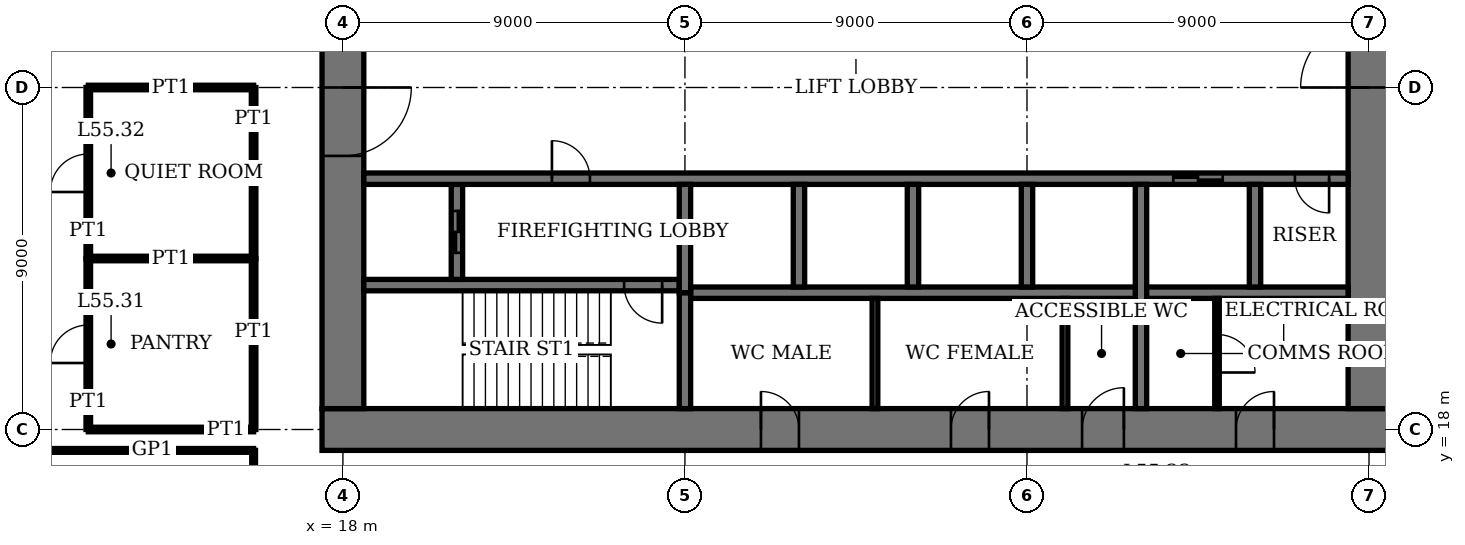
"""IFC4 building model, lengths in metres.
Left out: names, types, materials, properties, quantities, classifications, styles, units other than length and angle.
Written with IfcOpenShell. Run it as: python <this file> out.ifc"""

import sys

from ifc_helpers import new_model, si_unit, direction, frame, frame_2d, origin, place, context, subcontext, project, spatial, rectangle, extrude, element, fill, save


model = new_model("IFC4")
c1 = context("Model", 3, precision=1e-05, world=origin(), true_north=direction((0.0, 1.0)))
c2 = subcontext(c1, "Body", "Model", "MODEL_VIEW")
j1 = project(units=[si_unit("LENGTHUNIT", "METRE"), si_unit("PLANEANGLEUNIT", "RADIAN")], contexts=[c1])
p1 = place(None, origin())
s1 = spatial("IfcSite", under=j1, at=p1, CompositionType="ELEMENT")
p2 = place(p1, origin())
s2 = spatial("IfcBuilding", under=s1, at=p2, CompositionType="ELEMENT")
p3 = place(p2, frame((0.0, 0.0, 226.2)))
s3 = spatial("IfcBuildingStorey", under=s2, at=p3, CompositionType="ELEMENT", Elevation=226.2)
p4 = place(p3, frame((17.45, 18.0, 0.0), z_axis=(0.0, 0.0, 1.0), x_axis=(1.0, 0.0, 0.0)))
e1 = element("IfcWall", 1, at=p4, inside=s3, PredefinedType="SHEAR", context=c2, shape_type="SweptSolid", body=[
    extrude(rectangle(XDim=28.1, YDim=1.1, at=frame_2d((14.05, 0.0))), origin(), (0.0, 0.0, 1.0), 4.0),
])
p5 = place(p4, frame((11.55, 0.0, 0.0)))
e2 = element("IfcOpeningElement", 2, at=p5, cuts=e1, PredefinedType="OPENING", context=c2, shape_type="SweptSolid", body=[
    extrude(rectangle(XDim=1.0, YDim=2.4, at=frame_2d((0.5, 1.2))), frame((0.0, 0.56, 0.0), z_axis=(0.0, -1.0, 0.0), x_axis=(1.0, 0.0, 0.0)), (0.0, 0.0, 1.0), 1.12),
])
p6 = place(p4, frame((16.55, 0.0, 0.0)))
e3 = element("IfcOpeningElement", 3, at=p6, cuts=e1, PredefinedType="OPENING", context=c2, shape_type="SweptSolid", body=[
    extrude(rectangle(XDim=1.0, YDim=2.4, at=frame_2d((0.5, 1.2))), frame((0.0, 0.56, 0.0), z_axis=(0.0, -1.0, 0.0), x_axis=(1.0, 0.0, 0.0)), (0.0, 0.0, 1.0), 1.12),
])
p7 = place(p4, frame((20.0, 0.0, 0.0)))
e4 = element("IfcOpeningElement", 4, at=p7, cuts=e1, PredefinedType="OPENING", context=c2, shape_type="SweptSolid", body=[
    extrude(rectangle(XDim=1.1, YDim=2.4, at=frame_2d((0.55, 1.2))), frame((0.0, 0.56, 0.0), z_axis=(0.0, -1.0, 0.0), x_axis=(1.0, 0.0, 0.0)), (0.0, 0.0, 1.0), 1.12),
])
p8 = place(p4, frame((24.05, 0.0, 0.0)))
e5 = element("IfcOpeningElement", 5, at=p8, cuts=e1, PredefinedType="OPENING", context=c2, shape_type="SweptSolid", body=[
    extrude(rectangle(XDim=1.0, YDim=2.4, at=frame_2d((0.5, 1.2))), frame((0.0, 0.56, 0.0), z_axis=(0.0, -1.0, 0.0), x_axis=(1.0, 0.0, 0.0)), (0.0, 0.0, 1.0), 1.12),
])
p9 = place(p3, frame((18.0, 35.45, 0.0), z_axis=(0.0, 0.0, 1.0), x_axis=(0.0, -1.0, 0.0)))
e6 = element("IfcWall", 6, at=p9, inside=s3, PredefinedType="SHEAR", context=c2, shape_type="SweptSolid", body=[
    extrude(rectangle(XDim=16.9, YDim=1.1, at=frame_2d((8.45, 0.0))), origin(), (0.0, 0.0, 1.0), 4.0),
])
p10 = place(p9, frame((8.45, 0.0, 0.0)))
e7 = element("IfcOpeningElement", 7, at=p10, cuts=e6, PredefinedType="OPENING", context=c2, shape_type="SweptSolid", body=[
    extrude(rectangle(XDim=1.8, YDim=2.4, at=frame_2d((0.9, 1.2))), frame((0.0, 0.56, 0.0), z_axis=(0.0, -1.0, 0.0), x_axis=(1.0, 0.0, 0.0)), (0.0, 0.0, 1.0), 1.12),
])
p11 = place(p3, frame((45.0, 18.55, 0.0), z_axis=(0.0, 0.0, 1.0), x_axis=(0.0, 1.0, 0.0)))
e8 = element("IfcWall", 8, at=p11, inside=s3, PredefinedType="SHEAR", context=c2, shape_type="SweptSolid", body=[
    extrude(rectangle(XDim=16.9, YDim=1.1, at=frame_2d((8.45, 0.0))), origin(), (0.0, 0.0, 1.0), 4.0),
])
p12 = place(p11, frame((8.45, 0.0, 0.0)))
e9 = element("IfcOpeningElement", 9, at=p12, cuts=e8, PredefinedType="OPENING", context=c2, shape_type="SweptSolid", body=[
    extrude(rectangle(XDim=1.8, YDim=2.4, at=frame_2d((0.9, 1.2))), frame((0.0, 0.56, 0.0), z_axis=(0.0, -1.0, 0.0), x_axis=(1.0, 0.0, 0.0)), (0.0, 0.0, 1.0), 1.12),
])
p13 = place(p3, frame((18.55, 21.8, 0.0), z_axis=(0.0, 0.0, 1.0), x_axis=(1.0, 0.0, 0.0)))
e10 = element("IfcWall", 10, at=p13, inside=s3, PredefinedType="SHEAR", context=c2, shape_type="SweptSolid", body=[
    extrude(rectangle(XDim=8.3, YDim=0.3, at=frame_2d((4.15, 0.0))), origin(), (0.0, 0.0, 1.0), 4.0),
])
p14 = place(p13, frame((6.85, 0.0, 0.0)))
e11 = element("IfcOpeningElement", 11, at=p14, cuts=e10, PredefinedType="OPENING", context=c2, shape_type="SweptSolid", body=[
    extrude(rectangle(XDim=1.0, YDim=2.4, at=frame_2d((0.5, 1.2))), frame((0.0, 0.16, 0.0), z_axis=(0.0, -1.0, 0.0), x_axis=(1.0, 0.0, 0.0)), (0.0, 0.0, 1.0), 0.32),
])
p15 = place(p3, frame((27.0, 18.55, 0.0), z_axis=(0.0, 0.0, 1.0), x_axis=(0.0, 1.0, 0.0)))
e12 = element("IfcWall", 12, at=p15, inside=s3, PredefinedType="SHEAR", context=c2, shape_type="SweptSolid", body=[
    extrude(rectangle(XDim=3.05, YDim=0.3, at=frame_2d((1.525, 0.0))), origin(), (0.0, 0.0, 1.0), 4.0),
])
p16 = place(p3, frame((21.0, 21.95, 0.0), z_axis=(0.0, 0.0, 1.0), x_axis=(0.0, 1.0, 0.0)))
e13 = element("IfcWall", 13, at=p16, inside=s3, PredefinedType="SHEAR", context=c2, shape_type="SweptSolid", body=[
    extrude(rectangle(XDim=2.5, YDim=0.3, at=frame_2d((1.25, 0.0))), origin(), (0.0, 0.0, 1.0), 4.0),
])
p17 = place(p16, frame((0.7, 0.0, 0.0)))
e14 = element("IfcOpeningElement", 14, at=p17, cuts=e13, PredefinedType="OPENING", context=c2, shape_type="SweptSolid", body=[
    extrude(rectangle(XDim=1.1, YDim=2.4, at=frame_2d((0.55, 1.2))), frame((0.0, 0.16, 0.0), z_axis=(0.0, -1.0, 0.0), x_axis=(1.0, 0.0, 0.0)), (0.0, 0.0, 1.0), 0.32),
])
p18 = place(p3, frame((18.55, 24.6, 0.0), z_axis=(0.0, 0.0, 1.0), x_axis=(1.0, 0.0, 0.0)))
e15 = element("IfcWall", 15, at=p18, inside=s3, PredefinedType="SHEAR", context=c2, shape_type="SweptSolid", body=[
    extrude(rectangle(XDim=25.9, YDim=0.3, at=frame_2d((12.95, 0.0))), origin(), (0.0, 0.0, 1.0), 4.0),
])
p19 = place(p18, frame((4.95, 0.0, 0.0)))
e16 = element("IfcOpeningElement", 16, at=p19, cuts=e15, PredefinedType="OPENING", context=c2, shape_type="SweptSolid", body=[
    extrude(rectangle(XDim=1.0, YDim=2.4, at=frame_2d((0.5, 1.2))), frame((0.0, 0.16, 0.0), z_axis=(0.0, -1.0, 0.0), x_axis=(1.0, 0.0, 0.0)), (0.0, 0.0, 1.0), 0.32),
])
p20 = place(p18, frame((24.5, 0.0, 0.0)))
e17 = element("IfcOpeningElement", 17, at=p20, cuts=e15, PredefinedType="OPENING", context=c2, shape_type="SweptSolid", body=[
    extrude(rectangle(XDim=0.9, YDim=2.1, at=frame_2d((0.45, 1.05))), frame((0.0, 0.16, 0.0), z_axis=(0.0, -1.0, 0.0), x_axis=(1.0, 0.0, 0.0)), (0.0, 0.0, 1.0), 0.32),
])
p21 = place(p18, frame((21.3, 0.0, 0.0)))
e18 = element("IfcOpeningElement", 18, at=p21, cuts=e15, PredefinedType="OPENING", context=c2, shape_type="SweptSolid", body=[
    extrude(rectangle(XDim=1.3, YDim=2.4, at=frame_2d((0.65, 1.2))), frame((0.0, 0.16, 0.0), z_axis=(0.0, -1.0, 0.0), x_axis=(1.0, 0.0, 0.0)), (0.0, 0.0, 1.0), 0.32),
])
p22 = place(p3, frame((27.15, 21.6, 0.0), z_axis=(0.0, 0.0, 1.0), x_axis=(1.0, 0.0, 0.0)))
e19 = element("IfcWall", 19, at=p22, inside=s3, PredefinedType="SHEAR", context=c2, shape_type="SweptSolid", body=[
    extrude(rectangle(XDim=17.3, YDim=0.3, at=frame_2d((8.65, 0.0))), origin(), (0.0, 0.0, 1.0), 4.0),
])
for number, where, z_axis, x_axis in (
    (20, (30.0, 21.75, 0.0), (0.0, 0.0, 1.0), (0.0, 1.0, 0.0)),
    (21, (33.0, 21.75, 0.0), (0.0, 0.0, 1.0), (0.0, 1.0, 0.0)),
    (22, (36.0, 21.75, 0.0), (0.0, 0.0, 1.0), (0.0, 1.0, 0.0)),
):
    element("IfcWall", number, at=place(p3, frame(where, z_axis=z_axis, x_axis=x_axis)), inside=s3, PredefinedType="SHEAR", context=c2, shape_type="SweptSolid", body=[
        extrude(rectangle(XDim=2.7, YDim=0.3, at=frame_2d((1.35, 0.0))), origin(), (0.0, 0.0, 1.0), 4.0),
    ])
p23 = place(p3, frame((39.0, 18.55, 0.0), z_axis=(0.0, 0.0, 1.0), x_axis=(0.0, 1.0, 0.0)))
e23 = element("IfcWall", 23, at=p23, inside=s3, PredefinedType="SHEAR", context=c2, shape_type="SweptSolid", body=[
    extrude(rectangle(XDim=5.9, YDim=0.3, at=frame_2d((2.95, 0.0))), origin(), (0.0, 0.0, 1.0), 4.0),
])
p24 = place(p3, frame((42.0, 21.75, 0.0), z_axis=(0.0, 0.0, 1.0), x_axis=(0.0, 1.0, 0.0)))
e24 = element("IfcWall", 24, at=p24, inside=s3, PredefinedType="SHEAR", context=c2, shape_type="SweptSolid", body=[
    extrude(rectangle(XDim=2.7, YDim=0.3, at=frame_2d((1.35, 0.0))), origin(), (0.0, 0.0, 1.0), 4.0),
])
p25 = place(p3, frame((27.0, 21.6, 0.0), z_axis=(0.0, 0.0, 1.0), x_axis=(0.0, 1.0, 0.0)))
e25 = element("IfcWall", 25, at=p25, inside=s3, PredefinedType="SHEAR", context=c2, shape_type="SweptSolid", body=[
    extrude(rectangle(XDim=2.85, YDim=0.3, at=frame_2d((1.425, 0.0))), origin(), (0.0, 0.0, 1.0), 4.0),
])
p26 = place(p3, frame((9.7, 17.45, 0.0), z_axis=(0.0, 0.0, 1.0), x_axis=(1.0, 0.0, 0.0)))
e26 = element("IfcWall", 26, at=p26, inside=s3, PredefinedType="PARTITIONING", context=c2, shape_type="SweptSolid", body=[
    extrude(rectangle(XDim=5.95, YDim=0.1, at=frame_2d((2.975, 0.0))), origin(), (0.0, 0.0, 1.0), 3.05),
])
p27 = place(p3, frame((11.3, 18.0, 0.0), z_axis=(0.0, 0.0, 1.0), x_axis=(1.0, 0.0, 0.0)))
e27 = element("IfcWall", 27, at=p27, inside=s3, PredefinedType="PARTITIONING", context=c2, shape_type="SweptSolid", body=[
    extrude(rectangle(XDim=4.35, YDim=0.12, at=frame_2d((2.175, 0.0))), origin(), (0.0, 0.0, 1.0), 3.05),
])
p28 = place(p3, frame((11.3, 22.5, 0.0), z_axis=(0.0, 0.0, 1.0), x_axis=(1.0, 0.0, 0.0)))
e28 = element("IfcWall", 28, at=p28, inside=s3, PredefinedType="PARTITIONING", context=c2, shape_type="SweptSolid", body=[
    extrude(rectangle(XDim=4.35, YDim=0.12, at=frame_2d((2.175, 0.0))), origin(), (0.0, 0.0, 1.0), 3.1),
])
p29 = place(p3, frame((11.3, 27.0, 0.0), z_axis=(0.0, 0.0, 1.0), x_axis=(1.0, 0.0, 0.0)))
e29 = element("IfcWall", 29, at=p29, inside=s3, PredefinedType="PARTITIONING", context=c2, shape_type="SweptSolid", body=[
    extrude(rectangle(XDim=4.35, YDim=0.12, at=frame_2d((2.175, 0.0))), origin(), (0.0, 0.0, 1.0), 3.05),
])
p30 = place(p3, frame((11.3, 18.0, 0.0), z_axis=(0.0, 0.0, 1.0), x_axis=(0.0, 1.0, 0.0)))
e30 = element("IfcWall", 30, at=p30, inside=s3, PredefinedType="PARTITIONING", context=c2, shape_type="SweptSolid", body=[
    extrude(rectangle(XDim=4.5, YDim=0.12, at=frame_2d((2.25, 0.0))), origin(), (0.0, 0.0, 1.0), 3.75),
])
p31 = place(p30, frame((1.75, 0.0, 0.0)))
e31 = element("IfcOpeningElement", 31, at=p31, cuts=e30, PredefinedType="OPENING", context=c2, shape_type="SweptSolid", body=[
    extrude(rectangle(XDim=1.0, YDim=2.4, at=frame_2d((0.5, 1.2))), frame((0.0, 0.07, 0.0), z_axis=(0.0, -1.0, 0.0), x_axis=(1.0, 0.0, 0.0)), (0.0, 0.0, 1.0), 0.14),
])
p32 = place(p3, frame((11.3, 22.5, 0.0), z_axis=(0.0, 0.0, 1.0), x_axis=(0.0, 1.0, 0.0)))
e32 = element("IfcWall", 32, at=p32, inside=s3, PredefinedType="PARTITIONING", context=c2, shape_type="SweptSolid", body=[
    extrude(rectangle(XDim=4.5, YDim=0.12, at=frame_2d((2.25, 0.0))), origin(), (0.0, 0.0, 1.0), 3.75),
])
p33 = place(p32, frame((1.75, 0.0, 0.0)))
e33 = element("IfcOpeningElement", 33, at=p33, cuts=e32, PredefinedType="OPENING", context=c2, shape_type="SweptSolid", body=[
    extrude(rectangle(XDim=1.0, YDim=2.4, at=frame_2d((0.5, 1.2))), frame((0.0, 0.07, 0.0), z_axis=(0.0, -1.0, 0.0), x_axis=(1.0, 0.0, 0.0)), (0.0, 0.0, 1.0), 0.14),
])
for number, where, z_axis, x_axis in (
    (34, (15.65, 18.0, 0.0), (0.0, 0.0, 1.0), (0.0, 1.0, 0.0)),
    (35, (15.65, 22.5, 0.0), (0.0, 0.0, 1.0), (0.0, 1.0, 0.0)),
):
    element("IfcWall", number, at=place(p3, frame(where, z_axis=z_axis, x_axis=x_axis)), inside=s3, PredefinedType="PARTITIONING", context=c2, shape_type="SweptSolid", body=[
        extrude(rectangle(XDim=4.5, YDim=0.12, at=frame_2d((2.25, 0.0))), origin(), (0.0, 0.0, 1.0), 3.75),
    ])
p34 = place(p3, frame((15.65, 15.65, 0.0), z_axis=(0.0, 0.0, 1.0), x_axis=(0.0, 1.0, 0.0)))
e36 = element("IfcWall", 36, at=p34, inside=s3, PredefinedType="PARTITIONING", context=c2, shape_type="SweptSolid", body=[
    extrude(rectangle(XDim=1.8, YDim=0.1, at=frame_2d((0.9, 0.0))), origin(), (0.0, 0.0, 1.0), 3.75),
])
for number, where, z_axis, x_axis in (
    (37, (32.0, 18.55, 0.0), (0.0, 0.0, 1.0), (0.0, 1.0, 0.0)),
    (38, (37.0, 18.55, 0.0), (0.0, 0.0, 1.0), (0.0, 1.0, 0.0)),
):
    element("IfcWall", number, at=place(p3, frame(where, z_axis=z_axis, x_axis=x_axis)), inside=s3, PredefinedType="PARTITIONING", context=c2, shape_type="SweptSolid", body=[
        extrude(rectangle(XDim=2.9, YDim=0.15, at=frame_2d((1.45, 0.0))), origin(), (0.0, 0.0, 1.0), 3.75),
    ])
p35 = place(p3, frame((41.0, 18.55, 0.0), z_axis=(0.0, 0.0, 1.0), x_axis=(0.0, 1.0, 0.0)))
e39 = element("IfcWall", 39, at=p35, inside=s3, PredefinedType="PARTITIONING", context=c2, shape_type="SweptSolid", body=[
    extrude(rectangle(XDim=2.9, YDim=0.12, at=frame_2d((1.45, 0.0))), origin(), (0.0, 0.0, 1.0), 3.75),
])
p36 = place(p35, frame((0.95, 0.0, 0.0)))
e40 = element("IfcOpeningElement", 40, at=p36, cuts=e39, PredefinedType="OPENING", context=c2, shape_type="SweptSolid", body=[
    extrude(rectangle(XDim=1.0, YDim=2.4, at=frame_2d((0.5, 1.2))), frame((0.0, 0.07, 0.0), z_axis=(0.0, -1.0, 0.0), x_axis=(1.0, 0.0, 0.0)), (0.0, 0.0, 1.0), 0.14),
])
p37 = place(p10, origin())
e41 = element("IfcDoor", 41, at=p37, inside=s3, OperationType="DOUBLE_DOOR_DOUBLE_SWING", PredefinedType="DOOR", context=c2, shape_type="SweptSolid", body=[
    extrude(rectangle(XDim=1.8, YDim=2.4, at=frame_2d((0.9, 1.2))), frame((0.0, 0.03, 0.0), z_axis=(0.0, -1.0, 0.0), x_axis=(1.0, 0.0, 0.0)), (0.0, 0.0, 1.0), 0.06),
    extrude(rectangle(XDim=0.04, YDim=2.4, at=frame_2d((0.02, 1.2))), frame((0.0, 0.55, 0.0), z_axis=(0.0, -1.0, 0.0), x_axis=(1.0, 0.0, 0.0)), (0.0, 0.0, 1.0), 1.1),
    extrude(rectangle(XDim=0.04, YDim=2.4, at=frame_2d((1.78, 1.2))), frame((0.0, 0.55, 0.0), z_axis=(0.0, -1.0, 0.0), x_axis=(1.0, 0.0, 0.0)), (0.0, 0.0, 1.0), 1.1),
    extrude(rectangle(XDim=1.8, YDim=0.04, at=frame_2d((0.9, 2.38))), frame((0.0, 0.55, 0.0), z_axis=(0.0, -1.0, 0.0), x_axis=(1.0, 0.0, 0.0)), (0.0, 0.0, 1.0), 1.1),
])
fill(e7, e41)
p38 = place(p12, origin())
e42 = element("IfcDoor", 42, at=p38, inside=s3, OperationType="DOUBLE_DOOR_DOUBLE_SWING", PredefinedType="DOOR", context=c2, shape_type="SweptSolid", body=[
    extrude(rectangle(XDim=1.8, YDim=2.4, at=frame_2d((0.9, 1.2))), frame((0.0, 0.03, 0.0), z_axis=(0.0, -1.0, 0.0), x_axis=(1.0, 0.0, 0.0)), (0.0, 0.0, 1.0), 0.06),
    extrude(rectangle(XDim=0.04, YDim=2.4, at=frame_2d((0.02, 1.2))), frame((0.0, 0.55, 0.0), z_axis=(0.0, -1.0, 0.0), x_axis=(1.0, 0.0, 0.0)), (0.0, 0.0, 1.0), 1.1),
    extrude(rectangle(XDim=0.04, YDim=2.4, at=frame_2d((1.78, 1.2))), frame((0.0, 0.55, 0.0), z_axis=(0.0, -1.0, 0.0), x_axis=(1.0, 0.0, 0.0)), (0.0, 0.0, 1.0), 1.1),
    extrude(rectangle(XDim=1.8, YDim=0.04, at=frame_2d((0.9, 2.38))), frame((0.0, 0.55, 0.0), z_axis=(0.0, -1.0, 0.0), x_axis=(1.0, 0.0, 0.0)), (0.0, 0.0, 1.0), 1.1),
])
fill(e9, e42)
p39 = place(p5, origin())
e43 = element("IfcDoor", 43, at=p39, inside=s3, OperationType="SINGLE_SWING_RIGHT", PredefinedType="DOOR", context=c2, shape_type="SweptSolid", body=[
    extrude(rectangle(XDim=1.0, YDim=2.4, at=frame_2d((0.5, 1.2))), frame((0.0, 0.025, 0.0), z_axis=(0.0, -1.0, 0.0), x_axis=(1.0, 0.0, 0.0)), (0.0, 0.0, 1.0), 0.05),
    extrude(rectangle(XDim=0.04, YDim=2.4, at=frame_2d((0.02, 1.2))), frame((0.0, 0.4, 0.0), z_axis=(0.0, -1.0, 0.0), x_axis=(1.0, 0.0, 0.0)), (0.0, 0.0, 1.0), 0.8),
    extrude(rectangle(XDim=0.04, YDim=2.4, at=frame_2d((0.98, 1.2))), frame((0.0, 0.4, 0.0), z_axis=(0.0, -1.0, 0.0), x_axis=(1.0, 0.0, 0.0)), (0.0, 0.0, 1.0), 0.8),
    extrude(rectangle(XDim=1.0, YDim=0.04, at=frame_2d((0.5, 2.38))), frame((0.0, 0.4, 0.0), z_axis=(0.0, -1.0, 0.0), x_axis=(1.0, 0.0, 0.0)), (0.0, 0.0, 1.0), 0.8),
])
fill(e2, e43)
p40 = place(p6, origin())
e44 = element("IfcDoor", 44, at=p40, inside=s3, OperationType="SINGLE_SWING_LEFT", PredefinedType="DOOR", context=c2, shape_type="SweptSolid", body=[
    extrude(rectangle(XDim=1.0, YDim=2.4, at=frame_2d((0.5, 1.2))), frame((0.0, 0.025, 0.0), z_axis=(0.0, -1.0, 0.0), x_axis=(1.0, 0.0, 0.0)), (0.0, 0.0, 1.0), 0.05),
    extrude(rectangle(XDim=0.04, YDim=2.4, at=frame_2d((0.02, 1.2))), frame((0.0, 0.4, 0.0), z_axis=(0.0, -1.0, 0.0), x_axis=(1.0, 0.0, 0.0)), (0.0, 0.0, 1.0), 0.8),
    extrude(rectangle(XDim=0.04, YDim=2.4, at=frame_2d((0.98, 1.2))), frame((0.0, 0.4, 0.0), z_axis=(0.0, -1.0, 0.0), x_axis=(1.0, 0.0, 0.0)), (0.0, 0.0, 1.0), 0.8),
    extrude(rectangle(XDim=1.0, YDim=0.04, at=frame_2d((0.5, 2.38))), frame((0.0, 0.4, 0.0), z_axis=(0.0, -1.0, 0.0), x_axis=(1.0, 0.0, 0.0)), (0.0, 0.0, 1.0), 0.8),
])
fill(e3, e44)
p41 = place(p7, origin())
e45 = element("IfcDoor", 45, at=p41, inside=s3, OperationType="SINGLE_SWING_LEFT", PredefinedType="DOOR", context=c2, shape_type="SweptSolid", body=[
    extrude(rectangle(XDim=1.1, YDim=2.4, at=frame_2d((0.55, 1.2))), frame((0.0, 0.025, 0.0), z_axis=(0.0, -1.0, 0.0), x_axis=(1.0, 0.0, 0.0)), (0.0, 0.0, 1.0), 0.05),
    extrude(rectangle(XDim=0.04, YDim=2.4, at=frame_2d((0.02, 1.2))), frame((0.0, 0.44, 0.0), z_axis=(0.0, -1.0, 0.0), x_axis=(1.0, 0.0, 0.0)), (0.0, 0.0, 1.0), 0.88),
    extrude(rectangle(XDim=0.04, YDim=2.4, at=frame_2d((1.08, 1.2))), frame((0.0, 0.44, 0.0), z_axis=(0.0, -1.0, 0.0), x_axis=(1.0, 0.0, 0.0)), (0.0, 0.0, 1.0), 0.88),
    extrude(rectangle(XDim=1.1, YDim=0.04, at=frame_2d((0.55, 2.38))), frame((0.0, 0.44, 0.0), z_axis=(0.0, -1.0, 0.0), x_axis=(1.0, 0.0, 0.0)), (0.0, 0.0, 1.0), 0.88),
])
fill(e4, e45)
p42 = place(p8, origin())
e46 = element("IfcDoor", 46, at=p42, inside=s3, OperationType="SINGLE_SWING_LEFT", PredefinedType="DOOR", context=c2, shape_type="SweptSolid", body=[
    extrude(rectangle(XDim=1.0, YDim=2.4, at=frame_2d((0.5, 1.2))), frame((0.0, 0.025, 0.0), z_axis=(0.0, -1.0, 0.0), x_axis=(1.0, 0.0, 0.0)), (0.0, 0.0, 1.0), 0.05),
    extrude(rectangle(XDim=0.04, YDim=2.4, at=frame_2d((0.02, 1.2))), frame((0.0, 0.4, 0.0), z_axis=(0.0, -1.0, 0.0), x_axis=(1.0, 0.0, 0.0)), (0.0, 0.0, 1.0), 0.8),
    extrude(rectangle(XDim=0.04, YDim=2.4, at=frame_2d((0.98, 1.2))), frame((0.0, 0.4, 0.0), z_axis=(0.0, -1.0, 0.0), x_axis=(1.0, 0.0, 0.0)), (0.0, 0.0, 1.0), 0.8),
    extrude(rectangle(XDim=1.0, YDim=0.04, at=frame_2d((0.5, 2.38))), frame((0.0, 0.4, 0.0), z_axis=(0.0, -1.0, 0.0), x_axis=(1.0, 0.0, 0.0)), (0.0, 0.0, 1.0), 0.8),
])
fill(e5, e46)
p43 = place(p14, origin())
e47 = element("IfcDoor", 47, at=p43, inside=s3, OperationType="SINGLE_SWING_RIGHT", PredefinedType="DOOR", context=c2, shape_type="SweptSolid", body=[
    extrude(rectangle(XDim=1.0, YDim=2.4, at=frame_2d((0.5, 1.2))), frame((0.0, 0.03, 0.0), z_axis=(0.0, -1.0, 0.0), x_axis=(1.0, 0.0, 0.0)), (0.0, 0.0, 1.0), 0.06),
])
fill(e11, e47)
p44 = place(p19, origin())
e48 = element("IfcDoor", 48, at=p44, inside=s3, OperationType="SINGLE_SWING_RIGHT", PredefinedType="DOOR", context=c2, shape_type="SweptSolid", body=[
    extrude(rectangle(XDim=1.0, YDim=2.4, at=frame_2d((0.5, 1.2))), frame((0.0, 0.03, 0.0), z_axis=(0.0, -1.0, 0.0), x_axis=(1.0, 0.0, 0.0)), (0.0, 0.0, 1.0), 0.06),
])
fill(e16, e48)
p45 = place(p20, origin())
e49 = element("IfcDoor", 49, at=p45, inside=s3, OperationType="SINGLE_SWING_RIGHT", PredefinedType="DOOR", context=c2, shape_type="SweptSolid", body=[
    extrude(rectangle(XDim=0.9, YDim=2.1, at=frame_2d((0.45, 1.05))), frame((0.0, 0.03, 0.0), z_axis=(0.0, -1.0, 0.0), x_axis=(1.0, 0.0, 0.0)), (0.0, 0.0, 1.0), 0.06),
])
fill(e17, e49)
p46 = place(p31, origin())
e50 = element("IfcDoor", 50, at=p46, inside=s3, OperationType="SINGLE_SWING_RIGHT", PredefinedType="DOOR", context=c2, shape_type="SweptSolid", body=[
    extrude(rectangle(XDim=1.0, YDim=2.4, at=frame_2d((0.5, 1.2))), frame((0.0, 0.025, 0.0), z_axis=(0.0, -1.0, 0.0), x_axis=(1.0, 0.0, 0.0)), (0.0, 0.0, 1.0), 0.05),
])
fill(e31, e50)
p47 = place(p33, origin())
e51 = element("IfcDoor", 51, at=p47, inside=s3, OperationType="SINGLE_SWING_RIGHT", PredefinedType="DOOR", context=c2, shape_type="SweptSolid", body=[
    extrude(rectangle(XDim=1.0, YDim=2.4, at=frame_2d((0.5, 1.2))), frame((0.0, 0.025, 0.0), z_axis=(0.0, -1.0, 0.0), x_axis=(1.0, 0.0, 0.0)), (0.0, 0.0, 1.0), 0.05),
])
fill(e33, e51)
p48 = place(p36, origin())
e52 = element("IfcDoor", 52, at=p48, inside=s3, OperationType="SINGLE_SWING_LEFT", PredefinedType="DOOR", context=c2, shape_type="SweptSolid", body=[
    extrude(rectangle(XDim=1.0, YDim=2.4, at=frame_2d((0.5, 1.2))), frame((0.0, 0.03, 0.0), z_axis=(0.0, -1.0, 0.0), x_axis=(1.0, 0.0, 0.0)), (0.0, 0.0, 1.0), 0.06),
])
fill(e40, e52)
p49 = place(p21, origin())
e53 = element("IfcDoor", 53, at=p49, inside=s3, OperationType="DOUBLE_DOOR_SLIDING", PredefinedType="DOOR", context=c2, shape_type="SweptSolid", body=[
    extrude(rectangle(XDim=1.3, YDim=2.4, at=frame_2d((0.65, 1.2))), frame((0.0, 0.02, 0.0), z_axis=(0.0, -1.0, 0.0), x_axis=(1.0, 0.0, 0.0)), (0.0, 0.0, 1.0), 0.04),
])
fill(e18, e53)
p50 = place(p17, origin())
e54 = element("IfcDoor", 54, at=p50, inside=s3, OperationType="DOUBLE_DOOR_SLIDING", PredefinedType="DOOR", context=c2, shape_type="SweptSolid", body=[
    extrude(rectangle(XDim=1.1, YDim=2.4, at=frame_2d((0.55, 1.2))), frame((0.0, 0.03, 0.0), z_axis=(0.0, -1.0, 0.0), x_axis=(1.0, 0.0, 0.0)), (0.0, 0.0, 1.0), 0.06),
])
fill(e14, e54)
save(model, sys.argv[1])
